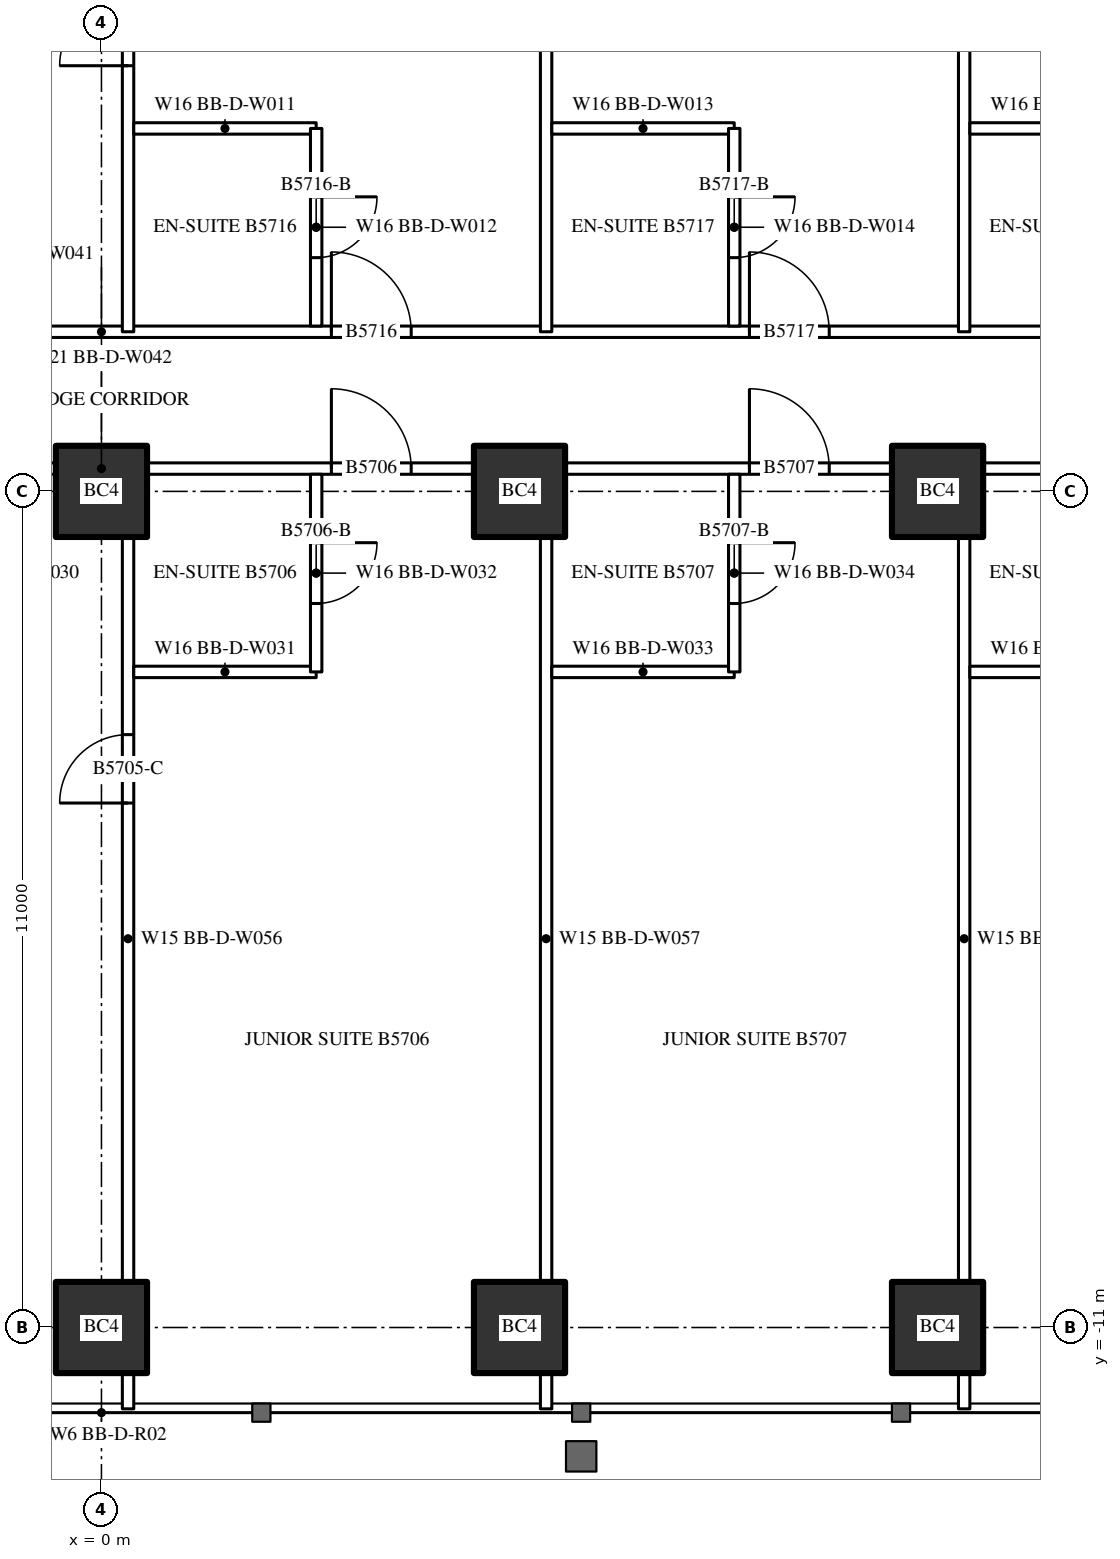
"""IFC4 building model, lengths in metres.
Left out: names, types, materials, properties, quantities, classifications, styles, units other than length and angle.
Written with IfcOpenShell. Run it as: python <this file> out.ifc"""

import sys

from ifc_helpers import new_model, si_unit, direction, frame, frame_2d, origin, origin_2d, place, context, subcontext, project, spatial, rectangle, hollow_rectangle, extrude, element, fill, save


model = new_model("IFC4")
c1 = context("Model", 3, precision=1e-05, world=origin(), true_north=direction((0.0, 1.0)))
c2 = subcontext(c1, "Body", "Model", "MODEL_VIEW")
j1 = project(units=[si_unit("LENGTHUNIT", "METRE"), si_unit("PLANEANGLEUNIT", "RADIAN")], contexts=[c1])
p1 = place(None, origin())
s1 = spatial("IfcSite", under=j1, at=p1, CompositionType="ELEMENT")
p2 = place(p1, origin())
s2 = spatial("IfcBuilding", under=s1, at=p2, CompositionType="ELEMENT")
p3 = place(p2, frame((0.0, 0.0, 215.3)))
s3 = spatial("IfcBuildingStorey", under=s2, at=p3, CompositionType="ELEMENT", Elevation=215.3)
for number, where, z_axis, x_axis in (
    (1, (0.0, -11.0, 0.0), (0.0, 0.0, 1.0), (1.0, 0.0, 0.0)),
    (2, (5.5, -11.0, 0.0), (0.0, 0.0, 1.0), (1.0, 0.0, 0.0)),
    (3, (11.0, -11.0, 0.0), (0.0, 0.0, 1.0), (1.0, 0.0, 0.0)),
    (4, (0.0, 0.0, 0.0), (0.0, 0.0, 1.0), (1.0, 0.0, 0.0)),
    (5, (5.5, 0.0, 0.0), (0.0, 0.0, 1.0), (1.0, 0.0, 0.0)),
    (6, (11.0, 0.0, 0.0), (0.0, 0.0, 1.0), (1.0, 0.0, 0.0)),
):
    element("IfcColumn", number, at=place(p3, frame(where, z_axis=z_axis, x_axis=x_axis)), inside=s3, PredefinedType="COLUMN", context=c2, shape_type="SweptSolid", body=[
        extrude(hollow_rectangle(XDim=1.2, YDim=1.2, WallThickness=0.12, at=origin_2d()), origin(), (0.0, 0.0, 1.0), 3.6),
    ])
p4 = place(p3, frame((-27.5, 0.3, 0.0), z_axis=(0.0, 0.0, 1.0), x_axis=(1.0, 0.0, 0.0)))
e7 = element("IfcWall", 7, at=p4, inside=s3, PredefinedType="PARTITIONING", context=c2, shape_type="SweptSolid", body=[
    extrude(rectangle(XDim=55.0, YDim=0.15, at=frame_2d((27.5, 0.0))), origin(), (0.0, 0.0, 1.0), 2.4),
])
p5 = place(p4, frame((1.575, 0.0, 0.0)))
e8 = element("IfcOpeningElement", 8, at=p5, cuts=e7, PredefinedType="OPENING", context=c2, shape_type="SweptSolid", body=[
    extrude(rectangle(XDim=1.0, YDim=2.2, at=frame_2d((0.5, 1.1))), frame((0.0, 0.085, 0.0), z_axis=(0.0, -1.0, 0.0), x_axis=(1.0, 0.0, 0.0)), (0.0, 0.0, 1.0), 0.17),
])
p6 = place(p4, frame((8.525, 0.0, 0.0)))
e9 = element("IfcOpeningElement", 9, at=p6, cuts=e7, PredefinedType="OPENING", context=c2, shape_type="SweptSolid", body=[
    extrude(rectangle(XDim=1.05, YDim=2.4, at=frame_2d((0.525, 1.2))), frame((0.0, 0.085, 0.0), z_axis=(0.0, -1.0, 0.0), x_axis=(1.0, 0.0, 0.0)), (0.0, 0.0, 1.0), 0.17),
])
p7 = place(p4, frame((14.025, 0.0, 0.0)))
e10 = element("IfcOpeningElement", 10, at=p7, cuts=e7, PredefinedType="OPENING", context=c2, shape_type="SweptSolid", body=[
    extrude(rectangle(XDim=1.05, YDim=2.4, at=frame_2d((0.525, 1.2))), frame((0.0, 0.085, 0.0), z_axis=(0.0, -1.0, 0.0), x_axis=(1.0, 0.0, 0.0)), (0.0, 0.0, 1.0), 0.17),
])
p8 = place(p4, frame((19.525, 0.0, 0.0)))
e11 = element("IfcOpeningElement", 11, at=p8, cuts=e7, PredefinedType="OPENING", context=c2, shape_type="SweptSolid", body=[
    extrude(rectangle(XDim=1.05, YDim=2.4, at=frame_2d((0.525, 1.2))), frame((0.0, 0.085, 0.0), z_axis=(0.0, -1.0, 0.0), x_axis=(1.0, 0.0, 0.0)), (0.0, 0.0, 1.0), 0.17),
])
p9 = place(p4, frame((25.025, 0.0, 0.0)))
e12 = element("IfcOpeningElement", 12, at=p9, cuts=e7, PredefinedType="OPENING", context=c2, shape_type="SweptSolid", body=[
    extrude(rectangle(XDim=1.05, YDim=2.4, at=frame_2d((0.525, 1.2))), frame((0.0, 0.085, 0.0), z_axis=(0.0, -1.0, 0.0), x_axis=(1.0, 0.0, 0.0)), (0.0, 0.0, 1.0), 0.17),
])
p10 = place(p4, frame((30.525, 0.0, 0.0)))
e13 = element("IfcOpeningElement", 13, at=p10, cuts=e7, PredefinedType="OPENING", context=c2, shape_type="SweptSolid", body=[
    extrude(rectangle(XDim=1.05, YDim=2.4, at=frame_2d((0.525, 1.2))), frame((0.0, 0.085, 0.0), z_axis=(0.0, -1.0, 0.0), x_axis=(1.0, 0.0, 0.0)), (0.0, 0.0, 1.0), 0.17),
])
p11 = place(p4, frame((36.025, 0.0, 0.0)))
e14 = element("IfcOpeningElement", 14, at=p11, cuts=e7, PredefinedType="OPENING", context=c2, shape_type="SweptSolid", body=[
    extrude(rectangle(XDim=1.05, YDim=2.4, at=frame_2d((0.525, 1.2))), frame((0.0, 0.085, 0.0), z_axis=(0.0, -1.0, 0.0), x_axis=(1.0, 0.0, 0.0)), (0.0, 0.0, 1.0), 0.17),
])
p12 = place(p4, frame((41.525, 0.0, 0.0)))
e15 = element("IfcOpeningElement", 15, at=p12, cuts=e7, PredefinedType="OPENING", context=c2, shape_type="SweptSolid", body=[
    extrude(rectangle(XDim=1.05, YDim=2.4, at=frame_2d((0.525, 1.2))), frame((0.0, 0.085, 0.0), z_axis=(0.0, -1.0, 0.0), x_axis=(1.0, 0.0, 0.0)), (0.0, 0.0, 1.0), 0.17),
])
p13 = place(p4, frame((47.025, 0.0, 0.0)))
e16 = element("IfcOpeningElement", 16, at=p13, cuts=e7, PredefinedType="OPENING", context=c2, shape_type="SweptSolid", body=[
    extrude(rectangle(XDim=1.05, YDim=2.4, at=frame_2d((0.525, 1.2))), frame((0.0, 0.085, 0.0), z_axis=(0.0, -1.0, 0.0), x_axis=(1.0, 0.0, 0.0)), (0.0, 0.0, 1.0), 0.17),
])
p14 = place(p4, frame((52.525, 0.0, 0.0)))
e17 = element("IfcOpeningElement", 17, at=p14, cuts=e7, PredefinedType="OPENING", context=c2, shape_type="SweptSolid", body=[
    extrude(rectangle(XDim=1.05, YDim=2.4, at=frame_2d((0.525, 1.2))), frame((0.0, 0.085, 0.0), z_axis=(0.0, -1.0, 0.0), x_axis=(1.0, 0.0, 0.0)), (0.0, 0.0, 1.0), 0.17),
])
p15 = place(p3, frame((-27.5, 2.1, 0.0), z_axis=(0.0, 0.0, 1.0), x_axis=(1.0, 0.0, 0.0)))
e18 = element("IfcWall", 18, at=p15, inside=s3, PredefinedType="PARTITIONING", context=c2, shape_type="SweptSolid", body=[
    extrude(rectangle(XDim=55.0, YDim=0.15, at=frame_2d((27.5, 0.0))), origin(), (0.0, 0.0, 1.0), 3.4),
])
p16 = place(p15, frame((2.025, 0.0, 0.0)))
e19 = element("IfcOpeningElement", 19, at=p16, cuts=e18, PredefinedType="OPENING", context=c2, shape_type="SweptSolid", body=[
    extrude(rectangle(XDim=1.05, YDim=2.4, at=frame_2d((0.525, 1.2))), frame((0.0, 0.085, 0.0), z_axis=(0.0, -1.0, 0.0), x_axis=(1.0, 0.0, 0.0)), (0.0, 0.0, 1.0), 0.17),
])
p17 = place(p15, frame((8.525, 0.0, 0.0)))
e20 = element("IfcOpeningElement", 20, at=p17, cuts=e18, PredefinedType="OPENING", context=c2, shape_type="SweptSolid", body=[
    extrude(rectangle(XDim=1.05, YDim=2.4, at=frame_2d((0.525, 1.2))), frame((0.0, 0.085, 0.0), z_axis=(0.0, -1.0, 0.0), x_axis=(1.0, 0.0, 0.0)), (0.0, 0.0, 1.0), 0.17),
])
p18 = place(p15, frame((14.025, 0.0, 0.0)))
e21 = element("IfcOpeningElement", 21, at=p18, cuts=e18, PredefinedType="OPENING", context=c2, shape_type="SweptSolid", body=[
    extrude(rectangle(XDim=1.05, YDim=2.4, at=frame_2d((0.525, 1.2))), frame((0.0, 0.085, 0.0), z_axis=(0.0, -1.0, 0.0), x_axis=(1.0, 0.0, 0.0)), (0.0, 0.0, 1.0), 0.17),
])
p19 = place(p15, frame((19.525, 0.0, 0.0)))
e22 = element("IfcOpeningElement", 22, at=p19, cuts=e18, PredefinedType="OPENING", context=c2, shape_type="SweptSolid", body=[
    extrude(rectangle(XDim=1.05, YDim=2.4, at=frame_2d((0.525, 1.2))), frame((0.0, 0.085, 0.0), z_axis=(0.0, -1.0, 0.0), x_axis=(1.0, 0.0, 0.0)), (0.0, 0.0, 1.0), 0.17),
])
p20 = place(p15, frame((25.025, 0.0, 0.0)))
e23 = element("IfcOpeningElement", 23, at=p20, cuts=e18, PredefinedType="OPENING", context=c2, shape_type="SweptSolid", body=[
    extrude(rectangle(XDim=1.05, YDim=2.4, at=frame_2d((0.525, 1.2))), frame((0.0, 0.085, 0.0), z_axis=(0.0, -1.0, 0.0), x_axis=(1.0, 0.0, 0.0)), (0.0, 0.0, 1.0), 0.17),
])
p21 = place(p15, frame((30.525, 0.0, 0.0)))
e24 = element("IfcOpeningElement", 24, at=p21, cuts=e18, PredefinedType="OPENING", context=c2, shape_type="SweptSolid", body=[
    extrude(rectangle(XDim=1.05, YDim=2.4, at=frame_2d((0.525, 1.2))), frame((0.0, 0.085, 0.0), z_axis=(0.0, -1.0, 0.0), x_axis=(1.0, 0.0, 0.0)), (0.0, 0.0, 1.0), 0.17),
])
p22 = place(p15, frame((36.025, 0.0, 0.0)))
e25 = element("IfcOpeningElement", 25, at=p22, cuts=e18, PredefinedType="OPENING", context=c2, shape_type="SweptSolid", body=[
    extrude(rectangle(XDim=1.05, YDim=2.4, at=frame_2d((0.525, 1.2))), frame((0.0, 0.085, 0.0), z_axis=(0.0, -1.0, 0.0), x_axis=(1.0, 0.0, 0.0)), (0.0, 0.0, 1.0), 0.17),
])
p23 = place(p15, frame((41.525, 0.0, 0.0)))
e26 = element("IfcOpeningElement", 26, at=p23, cuts=e18, PredefinedType="OPENING", context=c2, shape_type="SweptSolid", body=[
    extrude(rectangle(XDim=1.05, YDim=2.4, at=frame_2d((0.525, 1.2))), frame((0.0, 0.085, 0.0), z_axis=(0.0, -1.0, 0.0), x_axis=(1.0, 0.0, 0.0)), (0.0, 0.0, 1.0), 0.17),
])
p24 = place(p15, frame((47.025, 0.0, 0.0)))
e27 = element("IfcOpeningElement", 27, at=p24, cuts=e18, PredefinedType="OPENING", context=c2, shape_type="SweptSolid", body=[
    extrude(rectangle(XDim=1.05, YDim=2.4, at=frame_2d((0.525, 1.2))), frame((0.0, 0.085, 0.0), z_axis=(0.0, -1.0, 0.0), x_axis=(1.0, 0.0, 0.0)), (0.0, 0.0, 1.0), 0.17),
])
p25 = place(p15, frame((52.525, 0.0, 0.0)))
e28 = element("IfcOpeningElement", 28, at=p25, cuts=e18, PredefinedType="OPENING", context=c2, shape_type="SweptSolid", body=[
    extrude(rectangle(XDim=1.05, YDim=2.4, at=frame_2d((0.525, 1.2))), frame((0.0, 0.085, 0.0), z_axis=(0.0, -1.0, 0.0), x_axis=(1.0, 0.0, 0.0)), (0.0, 0.0, 1.0), 0.17),
])
p26 = place(p3, frame((0.35, -12.07, 0.0), z_axis=(0.0, 0.0, 1.0), x_axis=(0.0, 1.0, 0.0)))
e29 = element("IfcWall", 29, at=p26, inside=s3, PredefinedType="PARTITIONING", context=c2, shape_type="SweptSolid", body=[
    extrude(rectangle(XDim=12.37, YDim=0.15, at=frame_2d((6.185, 0.0))), origin(), (0.0, 0.0, 1.0), 3.4),
])
p27 = place(p26, frame((7.97, 0.0, 0.0)))
e30 = element("IfcOpeningElement", 30, at=p27, cuts=e29, PredefinedType="OPENING", context=c2, shape_type="SweptSolid", body=[
    extrude(rectangle(XDim=0.9, YDim=2.2, at=frame_2d((0.45, 1.1))), frame((0.0, 0.085, 0.0), z_axis=(0.0, -1.0, 0.0), x_axis=(1.0, 0.0, 0.0)), (0.0, 0.0, 1.0), 0.17),
])
for number, where, z_axis, x_axis in (
    (31, (5.85, -12.07, 0.0), (0.0, 0.0, 1.0), (0.0, 1.0, 0.0)),
    (32, (11.35, -12.07, 0.0), (0.0, 0.0, 1.0), (0.0, 1.0, 0.0)),
):
    element("IfcWall", number, at=place(p3, frame(where, z_axis=z_axis, x_axis=x_axis)), inside=s3, PredefinedType="PARTITIONING", context=c2, shape_type="SweptSolid", body=[
        extrude(rectangle(XDim=12.37, YDim=0.15, at=frame_2d((6.185, 0.0))), origin(), (0.0, 0.0, 1.0), 3.4),
    ])
p28 = place(p3, frame((0.425, -2.375, 0.0), z_axis=(0.0, 0.0, 1.0), x_axis=(1.0, 0.0, 0.0)))
e33 = element("IfcWall", 33, at=p28, inside=s3, PredefinedType="PARTITIONING", context=c2, shape_type="SweptSolid", body=[
    extrude(rectangle(XDim=2.4, YDim=0.15, at=frame_2d((1.2, 0.0))), origin(), (0.0, 0.0, 1.0), 3.4),
])
p29 = place(p3, frame((2.825, -2.375, 0.0), z_axis=(0.0, 0.0, 1.0), x_axis=(0.0, 1.0, 0.0)))
e34 = element("IfcWall", 34, at=p29, inside=s3, PredefinedType="PARTITIONING", context=c2, shape_type="SweptSolid", body=[
    extrude(rectangle(XDim=2.6, YDim=0.15, at=frame_2d((1.3, 0.0))), origin(), (0.0, 0.0, 1.0), 3.4),
])
p30 = place(p29, frame((0.9, 0.0, 0.0)))
e35 = element("IfcOpeningElement", 35, at=p30, cuts=e34, PredefinedType="OPENING", context=c2, shape_type="SweptSolid", body=[
    extrude(rectangle(XDim=0.8, YDim=2.2, at=frame_2d((0.4, 1.1))), frame((0.0, 0.085, 0.0), z_axis=(0.0, -1.0, 0.0), x_axis=(1.0, 0.0, 0.0)), (0.0, 0.0, 1.0), 0.17),
])
p31 = place(p3, frame((5.925, -2.375, 0.0), z_axis=(0.0, 0.0, 1.0), x_axis=(1.0, 0.0, 0.0)))
e36 = element("IfcWall", 36, at=p31, inside=s3, PredefinedType="PARTITIONING", context=c2, shape_type="SweptSolid", body=[
    extrude(rectangle(XDim=2.4, YDim=0.15, at=frame_2d((1.2, 0.0))), origin(), (0.0, 0.0, 1.0), 3.4),
])
p32 = place(p3, frame((8.325, -2.375, 0.0), z_axis=(0.0, 0.0, 1.0), x_axis=(0.0, 1.0, 0.0)))
e37 = element("IfcWall", 37, at=p32, inside=s3, PredefinedType="PARTITIONING", context=c2, shape_type="SweptSolid", body=[
    extrude(rectangle(XDim=2.6, YDim=0.15, at=frame_2d((1.3, 0.0))), origin(), (0.0, 0.0, 1.0), 3.4),
])
p33 = place(p32, frame((0.9, 0.0, 0.0)))
e38 = element("IfcOpeningElement", 38, at=p33, cuts=e37, PredefinedType="OPENING", context=c2, shape_type="SweptSolid", body=[
    extrude(rectangle(XDim=0.8, YDim=2.2, at=frame_2d((0.4, 1.1))), frame((0.0, 0.085, 0.0), z_axis=(0.0, -1.0, 0.0), x_axis=(1.0, 0.0, 0.0)), (0.0, 0.0, 1.0), 0.17),
])
p34 = place(p3, frame((11.425, -2.375, 0.0), z_axis=(0.0, 0.0, 1.0), x_axis=(1.0, 0.0, 0.0)))
e39 = element("IfcWall", 39, at=p34, inside=s3, PredefinedType="PARTITIONING", context=c2, shape_type="SweptSolid", body=[
    extrude(rectangle(XDim=2.4, YDim=0.15, at=frame_2d((1.2, 0.0))), origin(), (0.0, 0.0, 1.0), 3.4),
])
p35 = place(p3, frame((0.35, 2.1, 0.0), z_axis=(0.0, 0.0, 1.0), x_axis=(0.0, 1.0, 0.0)))
e40 = element("IfcWall", 40, at=p35, inside=s3, PredefinedType="PARTITIONING", context=c2, shape_type="SweptSolid", body=[
    extrude(rectangle(XDim=9.97, YDim=0.15, at=frame_2d((4.985, 0.0))), origin(), (0.0, 0.0, 1.0), 3.4),
])
p36 = place(p35, frame((3.5, 0.0, 0.0)))
e41 = element("IfcOpeningElement", 41, at=p36, cuts=e40, PredefinedType="OPENING", context=c2, shape_type="SweptSolid", body=[
    extrude(rectangle(XDim=0.9, YDim=2.2, at=frame_2d((0.45, 1.1))), frame((0.0, 0.085, 0.0), z_axis=(0.0, -1.0, 0.0), x_axis=(1.0, 0.0, 0.0)), (0.0, 0.0, 1.0), 0.17),
])
for number, where, z_axis, x_axis in (
    (42, (5.85, 2.1, 0.0), (0.0, 0.0, 1.0), (0.0, 1.0, 0.0)),
    (43, (11.35, 2.1, 0.0), (0.0, 0.0, 1.0), (0.0, 1.0, 0.0)),
):
    element("IfcWall", number, at=place(p3, frame(where, z_axis=z_axis, x_axis=x_axis)), inside=s3, PredefinedType="PARTITIONING", context=c2, shape_type="SweptSolid", body=[
        extrude(rectangle(XDim=9.97, YDim=0.15, at=frame_2d((4.985, 0.0))), origin(), (0.0, 0.0, 1.0), 3.4),
    ])
p37 = place(p3, frame((0.425, 4.775, 0.0), z_axis=(0.0, 0.0, 1.0), x_axis=(1.0, 0.0, 0.0)))
e44 = element("IfcWall", 44, at=p37, inside=s3, PredefinedType="PARTITIONING", context=c2, shape_type="SweptSolid", body=[
    extrude(rectangle(XDim=2.4, YDim=0.15, at=frame_2d((1.2, 0.0))), origin(), (0.0, 0.0, 1.0), 3.4),
])
p38 = place(p3, frame((2.825, 2.175, 0.0), z_axis=(0.0, 0.0, 1.0), x_axis=(0.0, 1.0, 0.0)))
e45 = element("IfcWall", 45, at=p38, inside=s3, PredefinedType="PARTITIONING", context=c2, shape_type="SweptSolid", body=[
    extrude(rectangle(XDim=2.6, YDim=0.15, at=frame_2d((1.3, 0.0))), origin(), (0.0, 0.0, 1.0), 3.4),
])
p39 = place(p38, frame((0.9, 0.0, 0.0)))
e46 = element("IfcOpeningElement", 46, at=p39, cuts=e45, PredefinedType="OPENING", context=c2, shape_type="SweptSolid", body=[
    extrude(rectangle(XDim=0.8, YDim=2.2, at=frame_2d((0.4, 1.1))), frame((0.0, 0.085, 0.0), z_axis=(0.0, -1.0, 0.0), x_axis=(1.0, 0.0, 0.0)), (0.0, 0.0, 1.0), 0.17),
])
p40 = place(p3, frame((5.925, 4.775, 0.0), z_axis=(0.0, 0.0, 1.0), x_axis=(1.0, 0.0, 0.0)))
e47 = element("IfcWall", 47, at=p40, inside=s3, PredefinedType="PARTITIONING", context=c2, shape_type="SweptSolid", body=[
    extrude(rectangle(XDim=2.4, YDim=0.15, at=frame_2d((1.2, 0.0))), origin(), (0.0, 0.0, 1.0), 3.4),
])
p41 = place(p3, frame((8.325, 2.175, 0.0), z_axis=(0.0, 0.0, 1.0), x_axis=(0.0, 1.0, 0.0)))
e48 = element("IfcWall", 48, at=p41, inside=s3, PredefinedType="PARTITIONING", context=c2, shape_type="SweptSolid", body=[
    extrude(rectangle(XDim=2.6, YDim=0.15, at=frame_2d((1.3, 0.0))), origin(), (0.0, 0.0, 1.0), 3.4),
])
p42 = place(p41, frame((0.9, 0.0, 0.0)))
e49 = element("IfcOpeningElement", 49, at=p42, cuts=e48, PredefinedType="OPENING", context=c2, shape_type="SweptSolid", body=[
    extrude(rectangle(XDim=0.8, YDim=2.2, at=frame_2d((0.4, 1.1))), frame((0.0, 0.085, 0.0), z_axis=(0.0, -1.0, 0.0), x_axis=(1.0, 0.0, 0.0)), (0.0, 0.0, 1.0), 0.17),
])
p43 = place(p3, frame((11.425, 4.775, 0.0), z_axis=(0.0, 0.0, 1.0), x_axis=(1.0, 0.0, 0.0)))
e50 = element("IfcWall", 50, at=p43, inside=s3, PredefinedType="PARTITIONING", context=c2, shape_type="SweptSolid", body=[
    extrude(rectangle(XDim=2.4, YDim=0.15, at=frame_2d((1.2, 0.0))), origin(), (0.0, 0.0, 1.0), 3.4),
])
p44 = place(p30, origin())
e51 = element("IfcDoor", 51, at=p44, inside=s3, OperationType="SINGLE_SWING_RIGHT", PredefinedType="DOOR", context=c2, shape_type="SweptSolid", body=[
    extrude(rectangle(XDim=0.8, YDim=2.2, at=frame_2d((0.4, 1.1))), frame((0.0, 0.025, 0.0), z_axis=(0.0, -1.0, 0.0), x_axis=(1.0, 0.0, 0.0)), (0.0, 0.0, 1.0), 0.05),
])
fill(e35, e51)
p45 = place(p10, origin())
e52 = element("IfcDoor", 52, at=p45, inside=s3, OperationType="SINGLE_SWING_LEFT", PredefinedType="DOOR", context=c2, shape_type="SweptSolid", body=[
    extrude(rectangle(XDim=1.05, YDim=2.4, at=frame_2d((0.525, 1.2))), frame((0.0, 0.025, 0.0), z_axis=(0.0, -1.0, 0.0), x_axis=(1.0, 0.0, 0.0)), (0.0, 0.0, 1.0), 0.05),
])
fill(e13, e52)
p46 = place(p33, origin())
e53 = element("IfcDoor", 53, at=p46, inside=s3, OperationType="SINGLE_SWING_RIGHT", PredefinedType="DOOR", context=c2, shape_type="SweptSolid", body=[
    extrude(rectangle(XDim=0.8, YDim=2.2, at=frame_2d((0.4, 1.1))), frame((0.0, 0.025, 0.0), z_axis=(0.0, -1.0, 0.0), x_axis=(1.0, 0.0, 0.0)), (0.0, 0.0, 1.0), 0.05),
])
fill(e38, e53)
p47 = place(p11, origin())
e54 = element("IfcDoor", 54, at=p47, inside=s3, OperationType="SINGLE_SWING_LEFT", PredefinedType="DOOR", context=c2, shape_type="SweptSolid", body=[
    extrude(rectangle(XDim=1.05, YDim=2.4, at=frame_2d((0.525, 1.2))), frame((0.0, 0.025, 0.0), z_axis=(0.0, -1.0, 0.0), x_axis=(1.0, 0.0, 0.0)), (0.0, 0.0, 1.0), 0.05),
])
fill(e14, e54)
p48 = place(p39, origin())
e55 = element("IfcDoor", 55, at=p48, inside=s3, OperationType="SINGLE_SWING_RIGHT", PredefinedType="DOOR", context=c2, shape_type="SweptSolid", body=[
    extrude(rectangle(XDim=0.8, YDim=2.2, at=frame_2d((0.4, 1.1))), frame((0.0, 0.025, 0.0), z_axis=(0.0, -1.0, 0.0), x_axis=(1.0, 0.0, 0.0)), (0.0, 0.0, 1.0), 0.05),
])
fill(e46, e55)
p49 = place(p21, origin())
e56 = element("IfcDoor", 56, at=p49, inside=s3, OperationType="SINGLE_SWING_LEFT", PredefinedType="DOOR", context=c2, shape_type="SweptSolid", body=[
    extrude(rectangle(XDim=1.05, YDim=2.4, at=frame_2d((0.525, 1.2))), frame((0.0, 0.025, 0.0), z_axis=(0.0, -1.0, 0.0), x_axis=(1.0, 0.0, 0.0)), (0.0, 0.0, 1.0), 0.05),
])
fill(e24, e56)
p50 = place(p42, origin())
e57 = element("IfcDoor", 57, at=p50, inside=s3, OperationType="SINGLE_SWING_RIGHT", PredefinedType="DOOR", context=c2, shape_type="SweptSolid", body=[
    extrude(rectangle(XDim=0.8, YDim=2.2, at=frame_2d((0.4, 1.1))), frame((0.0, 0.025, 0.0), z_axis=(0.0, -1.0, 0.0), x_axis=(1.0, 0.0, 0.0)), (0.0, 0.0, 1.0), 0.05),
])
fill(e49, e57)
p51 = place(p22, origin())
e58 = element("IfcDoor", 58, at=p51, inside=s3, OperationType="SINGLE_SWING_LEFT", PredefinedType="DOOR", context=c2, shape_type="SweptSolid", body=[
    extrude(rectangle(XDim=1.05, YDim=2.4, at=frame_2d((0.525, 1.2))), frame((0.0, 0.025, 0.0), z_axis=(0.0, -1.0, 0.0), x_axis=(1.0, 0.0, 0.0)), (0.0, 0.0, 1.0), 0.05),
])
fill(e25, e58)
p52 = place(p27, origin())
e59 = element("IfcDoor", 59, at=p52, inside=s3, OperationType="SINGLE_SWING_LEFT", PredefinedType="DOOR", context=c2, shape_type="SweptSolid", body=[
    extrude(rectangle(XDim=0.9, YDim=2.2, at=frame_2d((0.45, 1.1))), frame((0.0, 0.025, 0.0), z_axis=(0.0, -1.0, 0.0), x_axis=(1.0, 0.0, 0.0)), (0.0, 0.0, 1.0), 0.05),
])
fill(e30, e59)
p53 = place(p36, origin())
e60 = element("IfcDoor", 60, at=p53, inside=s3, OperationType="SINGLE_SWING_LEFT", PredefinedType="DOOR", context=c2, shape_type="SweptSolid", body=[
    extrude(rectangle(XDim=0.9, YDim=2.2, at=frame_2d((0.45, 1.1))), frame((0.0, 0.025, 0.0), z_axis=(0.0, -1.0, 0.0), x_axis=(1.0, 0.0, 0.0)), (0.0, 0.0, 1.0), 0.05),
])
fill(e41, e60)
save(model, sys.argv[1])
